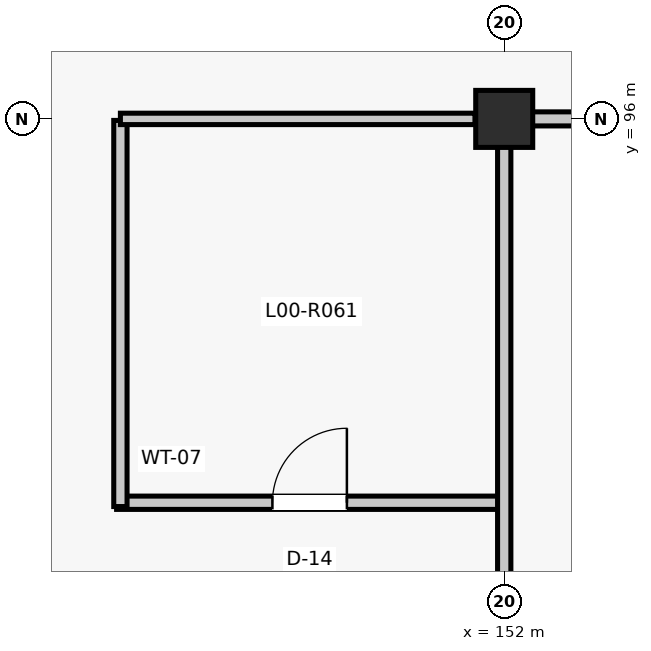
"""IFC4 building model, lengths in metres.
Left out: names, types, materials, properties, quantities, classifications, styles, units other than length and angle.
Written with IfcOpenShell. Run it as: python <this file> out.ifc"""

import sys

from ifc_helpers import new_model, si_unit, direction, frame, frame_2d, origin, origin_2d, place, context, subcontext, project, spatial, rectangle, extrude, element, fill, save


model = new_model("IFC4")
c1 = context("Model", 3, precision=1e-05, world=origin(), true_north=direction((0.0, 1.0)))
c2 = subcontext(c1, "Body", "Model", "MODEL_VIEW")
j1 = project(units=[si_unit("LENGTHUNIT", "METRE"), si_unit("PLANEANGLEUNIT", "RADIAN")], contexts=[c1])
p1 = place(None, origin())
s1 = spatial("IfcSite", under=j1, at=p1, CompositionType="ELEMENT")
p2 = place(p1, origin())
s2 = spatial("IfcBuilding", under=s1, at=p2, CompositionType="ELEMENT")
p3 = place(p2, origin())
s3 = spatial("IfcBuildingStorey", under=s2, at=p3, CompositionType="ELEMENT", Elevation=0.0)
p4 = place(p3, frame((152.0, 96.0, 0.0), z_axis=(0.0, 0.0, 1.0), x_axis=(1.0, 0.0, 0.0)))
e1 = element("IfcColumn", 1, at=p4, inside=s3, PredefinedType="COLUMN", context=c2, shape_type="SweptSolid", body=[
    extrude(rectangle(XDim=0.75, YDim=0.75, at=origin_2d()), origin(), (0.0, 0.0, 1.0), 5.28),
])
p5 = place(p3, frame((146.9, 90.95, 0.0), z_axis=(0.0, 0.0, 1.0), x_axis=(1.0, 0.0, 0.0)))
e2 = element("IfcWall", 2, at=p5, inside=s3, PredefinedType="PARTITIONING", context=c2, shape_type="SweptSolid", body=[
    extrude(rectangle(XDim=5.08, YDim=0.175, at=frame_2d((2.54, 0.0))), origin(), (0.0, 0.0, 1.0), 4.404),
])
p6 = place(p5, frame((2.05, 0.0, 0.0)))
e3 = element("IfcOpeningElement", 3, at=p6, cuts=e2, PredefinedType="OPENING", context=c2, shape_type="SweptSolid", body=[
    extrude(rectangle(XDim=0.98, YDim=2.15, at=frame_2d((0.49, 1.075))), frame((0.0, 0.097, 0.0), z_axis=(0.0, -1.0, 0.0), x_axis=(1.0, 0.0, 0.0)), (0.0, 0.0, 1.0), 0.195),
])
p7 = place(p3, frame((146.95, 90.9, 0.0), z_axis=(0.0, 0.0, 1.0), x_axis=(0.0, 1.0, 0.0)))
e4 = element("IfcWall", 4, at=p7, inside=s3, PredefinedType="PARTITIONING", context=c2, shape_type="SweptSolid", body=[
    extrude(rectangle(XDim=5.08, YDim=0.175, at=frame_2d((2.54, 0.0))), origin(), (0.0, 0.0, 1.0), 4.336),
])
p8 = place(p3, frame((146.95, 96.0, 0.0), z_axis=(0.0, 0.0, 1.0), x_axis=(1.0, 0.0, 0.0)))
e5 = element("IfcWall", 5, at=p8, inside=s3, PredefinedType="PARTITIONING", context=c2, shape_type="SweptSolid", body=[
    extrude(rectangle(XDim=4.665, YDim=0.15, at=frame_2d((2.333, 0.0))), origin(), (0.0, 0.0, 1.0), 4.336),
])
p9 = place(p3, frame((152.0, 88.365, 0.0), z_axis=(0.0, 0.0, 1.0), x_axis=(0.0, 1.0, 0.0)))
e6 = element("IfcWall", 6, at=p9, inside=s3, PredefinedType="PARTITIONING", context=c2, shape_type="SweptSolid", body=[
    extrude(rectangle(XDim=7.27, YDim=0.175, at=frame_2d((3.635, 0.0))), origin(), (0.0, 0.0, 1.0), 4.404),
])
p10 = place(p9, frame((0.52, 0.0, 0.0)))
e7 = element("IfcOpeningElement", 7, at=p10, cuts=e6, PredefinedType="OPENING", context=c2, shape_type="SweptSolid", body=[
    extrude(rectangle(XDim=0.94, YDim=2.12, at=frame_2d((0.47, 1.06))), frame((0.0, 0.097, 0.0), z_axis=(0.0, -1.0, 0.0), x_axis=(1.0, 0.0, 0.0)), (0.0, 0.0, 1.0), 0.195),
])
p11 = place(p3, frame((152.365, 96.0, 0.0), z_axis=(0.0, 0.0, 1.0), x_axis=(1.0, 0.0, 0.0)))
e8 = element("IfcWall", 8, at=p11, inside=s3, PredefinedType="PARTITIONING", context=c2, shape_type="SweptSolid", body=[
    extrude(rectangle(XDim=7.245, YDim=0.185, at=frame_2d((3.623, 0.0))), origin(), (0.0, 0.0, 1.0), 4.404),
])
p12 = place(p6, origin())
e9 = element("IfcDoor", 9, at=p12, inside=s3, OperationType="SINGLE_SWING_RIGHT", PredefinedType="DOOR", context=c2, shape_type="SweptSolid", body=[
    extrude(rectangle(XDim=0.98, YDim=2.15, at=frame_2d((0.49, 1.075))), frame((0.0, 0.025, 0.0), z_axis=(0.0, -1.0, 0.0), x_axis=(1.0, 0.0, 0.0)), (0.0, 0.0, 1.0), 0.05),
])
fill(e3, e9)
save(model, sys.argv[1])
